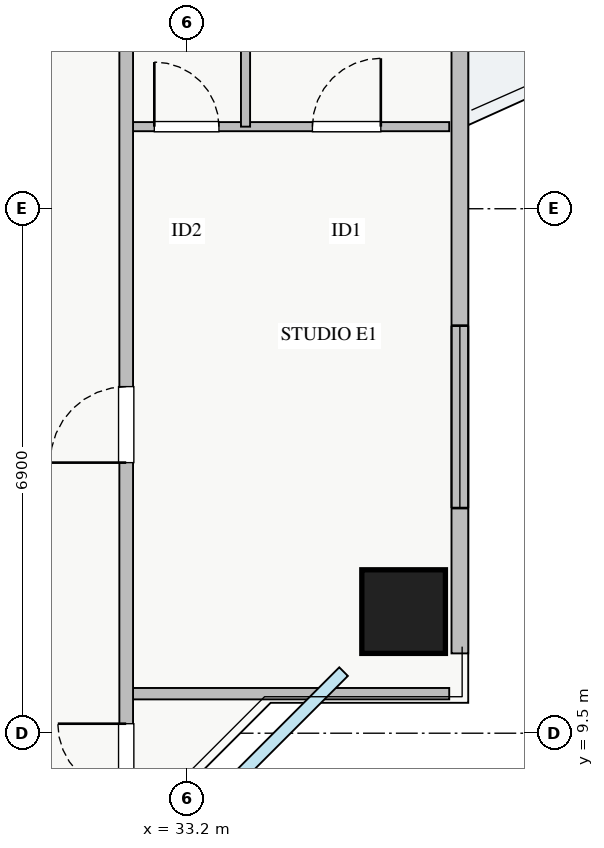
"""IFC4 building model, lengths in metres.
Left out: names, types, materials, properties, quantities, classifications, styles, units other than length and angle.
Written with IfcOpenShell. Run it as: python <this file> out.ifc"""

import sys

from ifc_helpers import new_model, si_unit, direction, frame, frame_2d, origin, origin_2d, place, context, subcontext, project, spatial, rectangle, extrude, source, transform, mapped, element, fill, save


model = new_model("IFC4")
c1 = context("Model", 3, precision=1e-05, world=origin(), true_north=direction((0.0, 1.0)))
c2 = subcontext(c1, "Body", "Model", "MODEL_VIEW")
j1 = project(units=[si_unit("LENGTHUNIT", "METRE"), si_unit("PLANEANGLEUNIT", "RADIAN")], contexts=[c1])
p1 = place(None, origin())
s1 = spatial("IfcSite", under=j1, at=p1, CompositionType="ELEMENT")
p2 = place(p1, origin())
s2 = spatial("IfcBuilding", under=s1, at=p2, CompositionType="ELEMENT")
p3 = place(p2, frame((0.0, 0.0, 132.75)))
s3 = spatial("IfcBuildingStorey", under=s2, at=p3, CompositionType="ELEMENT", Elevation=132.75)
m1 = source(origin(), c2, "Body", "SweptSolid", [
    extrude(rectangle(XDim=1.1, YDim=1.1, at=origin_2d()), origin(), (0.0, 0.0, 1.0), 3.25),
])
p4 = place(p3, frame((36.05, 11.1, 0.0), z_axis=(0.0, 0.0, 1.0), x_axis=(1.0, 0.0, 0.0)))
e1 = element("IfcColumn", 1, at=p4, inside=s3, PredefinedType="COLUMN", context=c2, shape_type="MappedRepresentation", body=[
    mapped(m1, transform((0.0, 0.0, 0.0), x_axis=(1.0, 0.0, 0.0), y_axis=(0.0, 1.0, 0.0), z_axis=(0.0, 0.0, 1.0), scale=1.0)),
])
p5 = place(p3, frame((36.79, 10.55, 0.0), z_axis=(0.0, 0.0, 1.0), x_axis=(0.0, 1.0, 0.0)))
e2 = element("IfcWall", 2, at=p5, inside=s3, PredefinedType="STANDARD", context=c2, shape_type="SweptSolid", body=[
    extrude(rectangle(XDim=24.9, YDim=0.22, at=frame_2d((12.45, 0.0))), origin(), (0.0, 0.0, 1.0), 2.61),
])
p6 = place(p5, frame((13.3, 0.0, 0.0)))
e3 = element("IfcOpeningElement", 3, at=p6, cuts=e2, PredefinedType="OPENING", context=c2, shape_type="SweptSolid", body=[
    extrude(rectangle(XDim=1.2, YDim=2.1, at=frame_2d((0.6, 1.05))), frame((0.0, 0.12, 0.0), z_axis=(0.0, -1.0, 0.0), x_axis=(1.0, 0.0, 0.0)), (0.0, 0.0, 1.0), 0.24),
])
p7 = place(p5, frame((1.912, 0.0, 0.9)))
e4 = element("IfcOpeningElement", 4, at=p7, cuts=e2, PredefinedType="OPENING", context=c2, shape_type="SweptSolid", body=[
    extrude(rectangle(XDim=2.4, YDim=1.48, at=frame_2d((1.2, 0.74))), frame((0.0, 0.12, 0.0), z_axis=(0.0, -1.0, 0.0), x_axis=(1.0, 0.0, 0.0)), (0.0, 0.0, 1.0), 0.24),
])
p8 = place(p5, frame((20.737, 0.0, 0.9)))
e5 = element("IfcOpeningElement", 5, at=p8, cuts=e2, PredefinedType="OPENING", context=c2, shape_type="SweptSolid", body=[
    extrude(rectangle(XDim=2.1, YDim=1.48, at=frame_2d((1.05, 0.74))), frame((0.0, 0.12, 0.0), z_axis=(0.0, -1.0, 0.0), x_axis=(1.0, 0.0, 0.0)), (0.0, 0.0, 1.0), 0.24),
])
p9 = place(p5, frame((14.72, 0.0, 0.9)))
e6 = element("IfcOpeningElement", 6, at=p9, cuts=e2, PredefinedType="OPENING", context=c2, shape_type="SweptSolid", body=[
    extrude(rectangle(XDim=0.9, YDim=1.2, at=frame_2d((0.45, 0.6))), frame((0.0, 0.12, 0.0), z_axis=(0.0, -1.0, 0.0), x_axis=(1.0, 0.0, 0.0)), (0.0, 0.0, 1.0), 0.24),
])
p10 = place(p3, frame((32.4, 10.02, 0.0), z_axis=(0.0, 0.0, 1.0), x_axis=(1.0, 0.0, 0.0)))
e7 = element("IfcWall", 7, at=p10, inside=s3, PredefinedType="PARTITIONING", context=c2, shape_type="SweptSolid", body=[
    extrude(rectangle(XDim=4.25, YDim=0.15, at=frame_2d((2.125, 0.0))), origin(), (0.0, 0.0, 1.0), 3.07),
])
p11 = place(p3, frame((32.4, 17.48, 0.0), z_axis=(0.0, 0.0, 1.0), x_axis=(1.0, 0.0, 0.0)))
e8 = element("IfcWall", 8, at=p11, inside=s3, PredefinedType="PLUMBINGWALL", context=c2, shape_type="SweptSolid", body=[
    extrude(rectangle(XDim=4.25, YDim=0.12, at=frame_2d((2.125, 0.0))), origin(), (0.0, 0.0, 1.0), 3.07),
])
p12 = place(p11, frame((0.37, 0.0, 0.0)))
e9 = element("IfcOpeningElement", 9, at=p12, cuts=e8, PredefinedType="OPENING", context=c2, shape_type="SweptSolid", body=[
    extrude(rectangle(XDim=0.85, YDim=2.05, at=frame_2d((0.425, 1.025))), frame((0.0, 0.07, 0.0), z_axis=(0.0, -1.0, 0.0), x_axis=(1.0, 0.0, 0.0)), (0.0, 0.0, 1.0), 0.14),
])
p13 = place(p11, frame((2.45, 0.0, 0.0)))
e10 = element("IfcOpeningElement", 10, at=p13, cuts=e8, PredefinedType="OPENING", context=c2, shape_type="SweptSolid", body=[
    extrude(rectangle(XDim=0.9, YDim=2.05, at=frame_2d((0.45, 1.025))), frame((0.0, 0.07, 0.0), z_axis=(0.0, -1.0, 0.0), x_axis=(1.0, 0.0, 0.0)), (0.0, 0.0, 1.0), 0.14),
])
p14 = place(p3, frame((33.97, 17.48, 0.0), z_axis=(0.0, 0.0, 1.0), x_axis=(0.0, 1.0, 0.0)))
e11 = element("IfcWall", 11, at=p14, inside=s3, PredefinedType="PLUMBINGWALL", context=c2, shape_type="SweptSolid", body=[
    extrude(rectangle(XDim=6.35, YDim=0.12, at=frame_2d((3.175, 0.0))), origin(), (0.0, 0.0, 1.0), 3.07),
])
p15 = place(p3, frame((32.4, 8.31, 0.0), z_axis=(0.0, 0.0, 1.0), x_axis=(0.0, 1.0, 0.0)))
e12 = element("IfcWall", 12, at=p15, inside=s3, PredefinedType="PARTITIONING", context=c2, shape_type="SweptSolid", body=[
    extrude(rectangle(XDim=29.13, YDim=0.18, at=frame_2d((14.565, 0.0))), origin(), (0.0, 0.0, 1.0), 3.07),
])
p16 = place(p15, frame((27.94, 0.0, 0.0)))
e13 = element("IfcOpeningElement", 13, at=p16, cuts=e12, PredefinedType="OPENING", context=c2, shape_type="SweptSolid", body=[
    extrude(rectangle(XDim=0.9, YDim=2.05, at=frame_2d((0.45, 1.025))), frame((0.0, 0.1, 0.0), z_axis=(0.0, -1.0, 0.0), x_axis=(1.0, 0.0, 0.0)), (0.0, 0.0, 1.0), 0.2),
])
p17 = place(p15, frame((0.415, 0.0, 0.0)))
e14 = element("IfcOpeningElement", 14, at=p17, cuts=e12, PredefinedType="OPENING", context=c2, shape_type="SweptSolid", body=[
    extrude(rectangle(XDim=0.9, YDim=2.05, at=frame_2d((0.45, 1.025))), frame((0.0, 0.1, 0.0), z_axis=(0.0, -1.0, 0.0), x_axis=(1.0, 0.0, 0.0)), (0.0, 0.0, 1.0), 0.2),
])
p18 = place(p15, frame((4.75, 0.0, 0.0)))
e15 = element("IfcOpeningElement", 15, at=p18, cuts=e12, PredefinedType="OPENING", context=c2, shape_type="SweptSolid", body=[
    extrude(rectangle(XDim=1.0, YDim=2.05, at=frame_2d((0.5, 1.025))), frame((0.0, 0.1, 0.0), z_axis=(0.0, -1.0, 0.0), x_axis=(1.0, 0.0, 0.0)), (0.0, 0.0, 1.0), 0.2),
])
p19 = place(p15, frame((18.11, 0.0, 0.0)))
e16 = element("IfcOpeningElement", 16, at=p19, cuts=e12, PredefinedType="OPENING", context=c2, shape_type="SweptSolid", body=[
    extrude(rectangle(XDim=1.0, YDim=2.05, at=frame_2d((0.5, 1.025))), frame((0.0, 0.1, 0.0), z_axis=(0.0, -1.0, 0.0), x_axis=(1.0, 0.0, 0.0)), (0.0, 0.0, 1.0), 0.2),
])
m2 = source(origin(), c2, "Body", "SweptSolid", [
    extrude(rectangle(XDim=2.4, YDim=1.48, at=frame_2d((1.2, 0.74))), frame((0.0, 0.03, 0.0), z_axis=(0.0, -1.0, 0.0), x_axis=(1.0, 0.0, 0.0)), (0.0, 0.0, 1.0), 0.06),
])
p20 = place(p7, origin())
e17 = element("IfcWindow", 17, at=p20, inside=s3, PartitioningType="TRIPLE_PANEL_VERTICAL", PredefinedType="WINDOW", context=c2, shape_type="MappedRepresentation", body=[
    mapped(m2, transform((0.0, 0.0, 0.0), x_axis=(1.0, 0.0, 0.0), y_axis=(0.0, 1.0, 0.0), z_axis=(0.0, 0.0, 1.0), scale=1.0)),
])
fill(e4, e17)
m3 = source(origin(), c2, "Body", "SweptSolid", [
    extrude(rectangle(XDim=0.85, YDim=2.05, at=frame_2d((0.425, 1.025))), frame((0.0, 0.025, 0.0), z_axis=(0.0, -1.0, 0.0), x_axis=(1.0, 0.0, 0.0)), (0.0, 0.0, 1.0), 0.05),
])
p21 = place(p12, origin())
e18 = element("IfcDoor", 18, at=p21, inside=s3, OperationType="SINGLE_SWING_LEFT", PredefinedType="DOOR", context=c2, shape_type="MappedRepresentation", body=[
    mapped(m3, transform((0.0, 0.0, 0.0), x_axis=(1.0, 0.0, 0.0), y_axis=(0.0, 1.0, 0.0), z_axis=(0.0, 0.0, 1.0), scale=1.0)),
])
fill(e9, e18)
m4 = source(origin(), c2, "Body", "SweptSolid", [
    extrude(rectangle(XDim=0.9, YDim=2.05, at=frame_2d((0.45, 1.025))), frame((0.0, 0.025, 0.0), z_axis=(0.0, -1.0, 0.0), x_axis=(1.0, 0.0, 0.0)), (0.0, 0.0, 1.0), 0.05),
])
p22 = place(p13, origin())
e19 = element("IfcDoor", 19, at=p22, inside=s3, OperationType="SINGLE_SWING_RIGHT", PredefinedType="DOOR", context=c2, shape_type="MappedRepresentation", body=[
    mapped(m4, transform((0.0, 0.0, 0.0), x_axis=(1.0, 0.0, 0.0), y_axis=(0.0, 1.0, 0.0), z_axis=(0.0, 0.0, 1.0), scale=1.0)),
])
fill(e10, e19)
p23 = place(p17, origin())
e20 = element("IfcDoor", 20, at=p23, inside=s3, OperationType="SINGLE_SWING_RIGHT", PredefinedType="DOOR", context=c2, shape_type="MappedRepresentation", body=[
    mapped(m4, transform((0.0, 0.0, 0.0), x_axis=(1.0, 0.0, 0.0), y_axis=(0.0, 1.0, 0.0), z_axis=(0.0, 0.0, 1.0), scale=1.0)),
])
fill(e14, e20)
m5 = source(origin(), c2, "Body", "SweptSolid", [
    extrude(rectangle(XDim=1.0, YDim=2.05, at=frame_2d((0.5, 1.025))), frame((0.0, 0.025, 0.0), z_axis=(0.0, -1.0, 0.0), x_axis=(1.0, 0.0, 0.0)), (0.0, 0.0, 1.0), 0.05),
])
p24 = place(p18, origin())
e21 = element("IfcDoor", 21, at=p24, inside=s3, OperationType="SINGLE_SWING_LEFT", PredefinedType="DOOR", context=c2, shape_type="MappedRepresentation", body=[
    mapped(m5, transform((0.0, 0.0, 0.0), x_axis=(1.0, 0.0, 0.0), y_axis=(0.0, 1.0, 0.0), z_axis=(0.0, 0.0, 1.0), scale=1.0)),
])
fill(e15, e21)
save(model, sys.argv[1])
